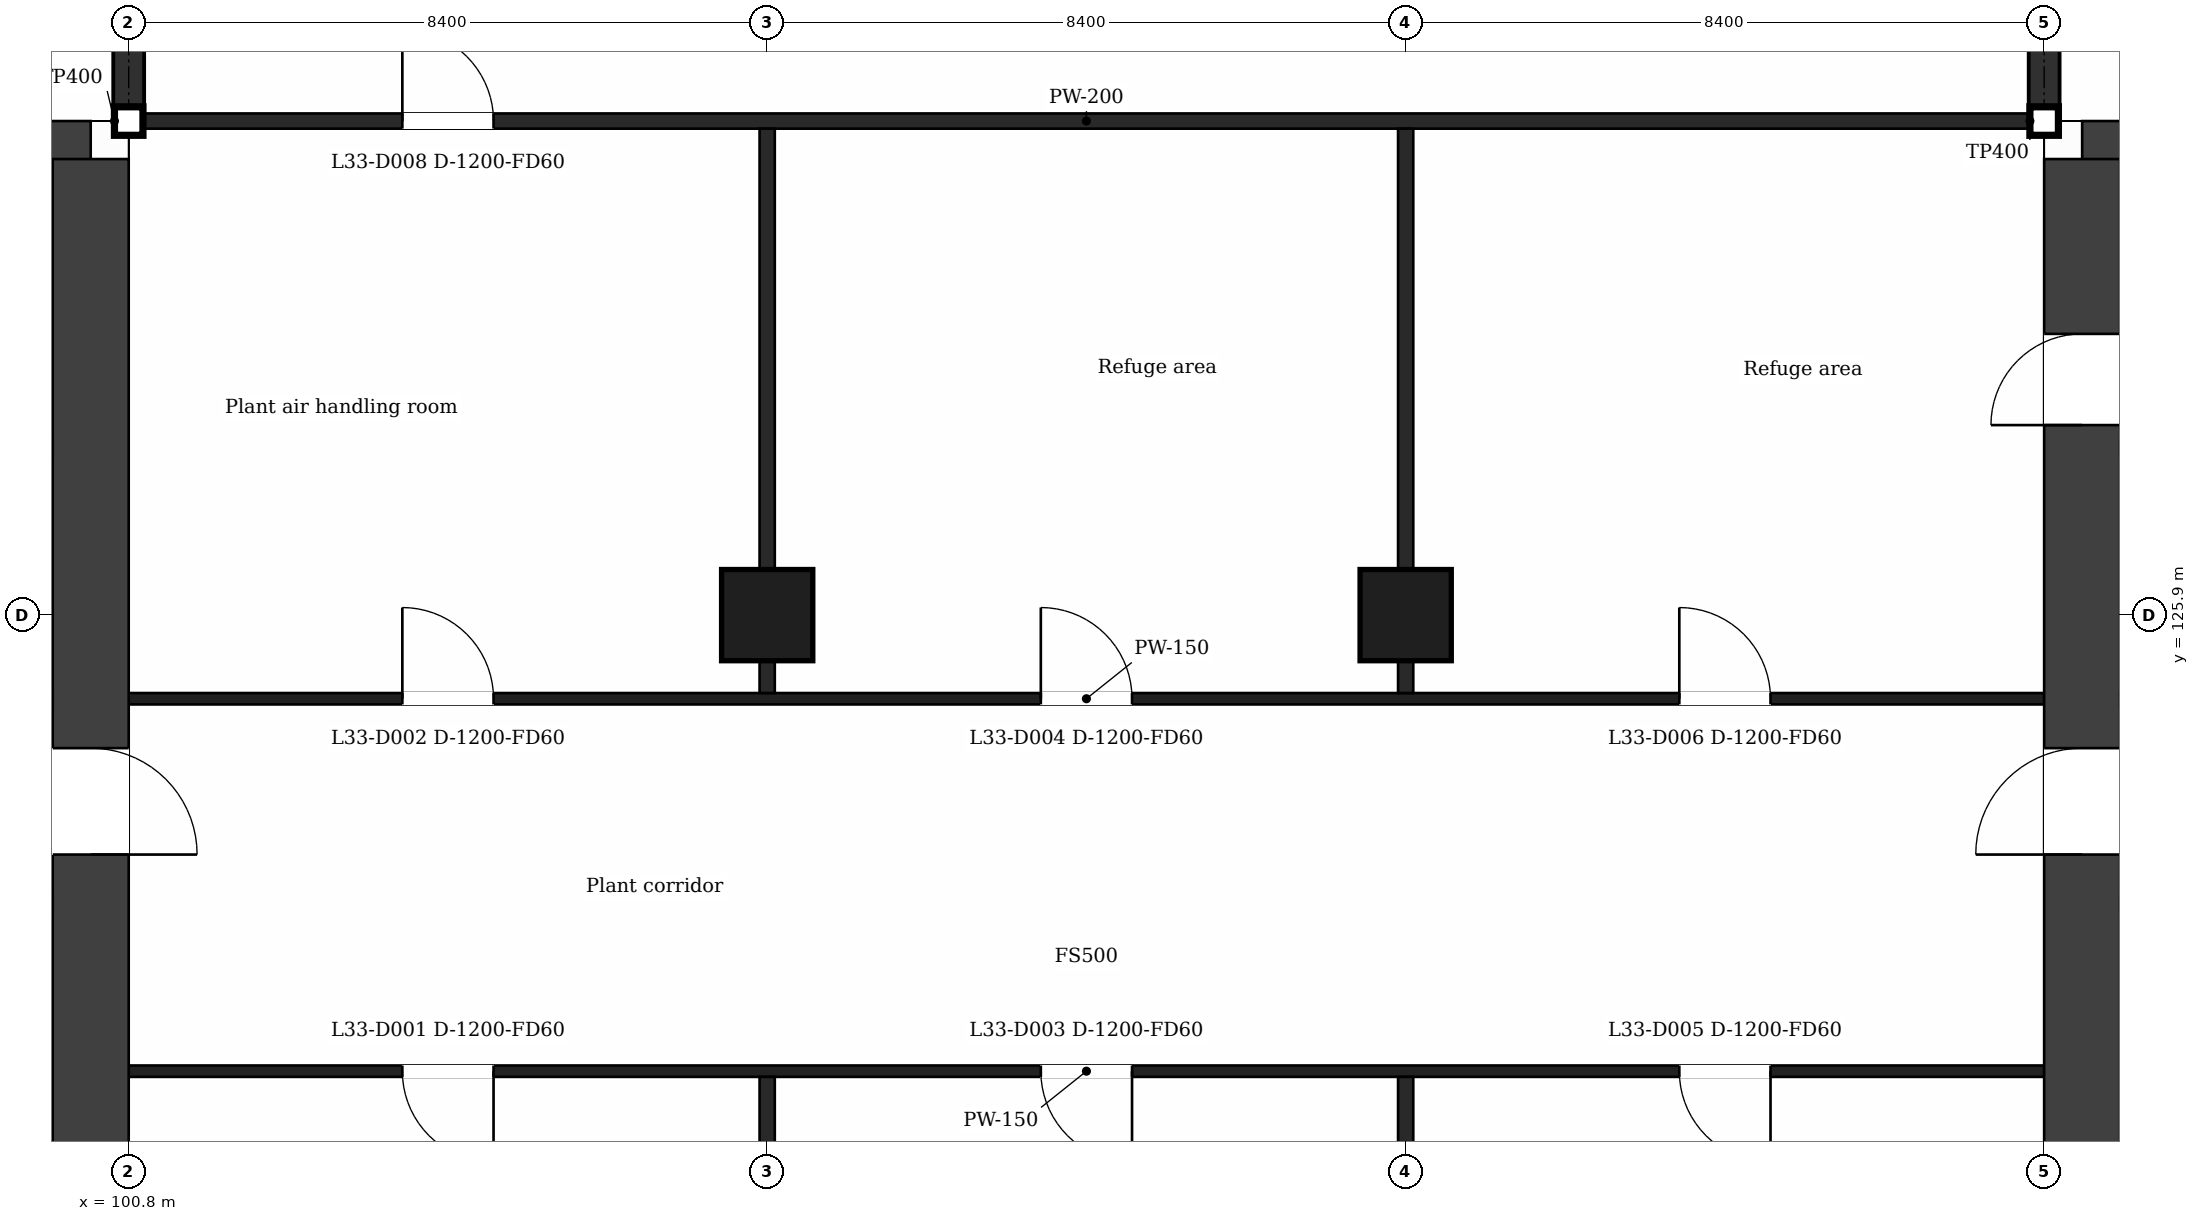
"""IFC4 building model, lengths in metres.
Left out: names, types, materials, properties, quantities, classifications, styles, units other than length and angle.
Written with IfcOpenShell. Run it as: python <this file> out.ifc"""

import sys

from ifc_helpers import new_model, si_unit, direction, frame, frame_2d, origin, origin_2d, place, context, subcontext, project, spatial, rectangle, extrude, element, fill, save


model = new_model("IFC4")
c1 = context("Model", 3, precision=1e-05, world=origin(), true_north=direction((0.0, 1.0)))
c2 = subcontext(c1, "Body", "Model", "MODEL_VIEW")
j1 = project(units=[si_unit("LENGTHUNIT", "METRE"), si_unit("PLANEANGLEUNIT", "RADIAN")], contexts=[c1])
p1 = place(None, origin())
s1 = spatial("IfcSite", under=j1, at=p1, CompositionType="ELEMENT")
p2 = place(p1, origin())
s2 = spatial("IfcBuilding", under=s1, at=p2, CompositionType="ELEMENT")
p3 = place(p2, frame((0.0, 0.0, 142.8)))
s3 = spatial("IfcBuildingStorey", under=s2, at=p3, CompositionType="ELEMENT", Elevation=142.8)
p4 = place(p3, frame((89.068, 131.9, 0.0), z_axis=(0.0, 0.0, 1.0), x_axis=(1.0, 0.0, 0.0)))
e1 = element("IfcWall", 1, at=p4, inside=s3, PredefinedType="SHEAR", context=c2, shape_type="SweptSolid", body=[
    extrude(rectangle(XDim=11.232, YDim=1.0, at=frame_2d((5.616, 0.0))), origin(), (0.0, 0.0, 1.0), 5.0),
])
p5 = place(p4, frame((6.646, 0.0, 0.0)))
e2 = element("IfcOpeningElement", 2, at=p5, cuts=e1, PredefinedType="OPENING", context=c2, shape_type="SweptSolid", body=[
    extrude(rectangle(XDim=1.2, YDim=2.1, at=frame_2d((0.6, 1.05))), frame((0.0, 0.51, 0.0), z_axis=(0.0, -1.0, 0.0), x_axis=(1.0, 0.0, 0.0)), (0.0, 0.0, 1.0), 1.02),
])
p6 = place(p3, frame((100.3, 131.9, 0.0), z_axis=(0.0, 0.0, 1.0), x_axis=(0.0, -1.0, 0.0)))
e3 = element("IfcWall", 3, at=p6, inside=s3, PredefinedType="SHEAR", context=c2, shape_type="SweptSolid", body=[
    extrude(rectangle(XDim=21.0, YDim=1.0, at=frame_2d((10.5, 0.0))), origin(), (0.0, 0.0, 1.0), 5.0),
])
p7 = place(p6, frame((18.7, 0.0, 0.0)))
e4 = element("IfcOpeningElement", 4, at=p7, cuts=e3, PredefinedType="OPENING", context=c2, shape_type="SweptSolid", body=[
    extrude(rectangle(XDim=1.2, YDim=2.1, at=frame_2d((0.6, 1.05))), frame((0.0, 0.51, 0.0), z_axis=(0.0, -1.0, 0.0), x_axis=(1.0, 0.0, 0.0)), (0.0, 0.0, 1.0), 1.02),
])
p8 = place(p6, frame((7.75, 0.0, 0.0)))
e5 = element("IfcOpeningElement", 5, at=p8, cuts=e3, PredefinedType="OPENING", context=c2, shape_type="SweptSolid", body=[
    extrude(rectangle(XDim=1.4, YDim=2.1, at=frame_2d((0.7, 1.05))), frame((0.0, 0.51, 0.0), z_axis=(0.0, -1.0, 0.0), x_axis=(1.0, 0.0, 0.0)), (0.0, 0.0, 1.0), 1.02),
])
p9 = place(p3, frame((126.5, 131.9, 0.0), z_axis=(0.0, 0.0, 1.0), x_axis=(1.0, 0.0, 0.0)))
e6 = element("IfcWall", 6, at=p9, inside=s3, PredefinedType="SHEAR", context=c2, shape_type="SweptSolid", body=[
    extrude(rectangle(XDim=11.232, YDim=1.0, at=frame_2d((5.616, 0.0))), origin(), (0.0, 0.0, 1.0), 5.0),
])
p10 = place(p9, frame((3.386, 0.0, 0.0)))
e7 = element("IfcOpeningElement", 7, at=p10, cuts=e6, PredefinedType="OPENING", context=c2, shape_type="SweptSolid", body=[
    extrude(rectangle(XDim=1.2, YDim=2.1, at=frame_2d((0.6, 1.05))), frame((0.0, 0.51, 0.0), z_axis=(0.0, -1.0, 0.0), x_axis=(1.0, 0.0, 0.0)), (0.0, 0.0, 1.0), 1.02),
])
p11 = place(p3, frame((126.5, 110.9, 0.0), z_axis=(0.0, 0.0, 1.0), x_axis=(0.0, 1.0, 0.0)))
e8 = element("IfcWall", 8, at=p11, inside=s3, PredefinedType="SHEAR", context=c2, shape_type="SweptSolid", body=[
    extrude(rectangle(XDim=21.0, YDim=1.0, at=frame_2d((10.5, 0.0))), origin(), (0.0, 0.0, 1.0), 5.0),
])
p12 = place(p11, frame((17.5, 0.0, 0.0)))
e9 = element("IfcOpeningElement", 9, at=p12, cuts=e8, PredefinedType="OPENING", context=c2, shape_type="SweptSolid", body=[
    extrude(rectangle(XDim=1.2, YDim=2.1, at=frame_2d((0.6, 1.05))), frame((0.0, 0.51, 0.0), z_axis=(0.0, -1.0, 0.0), x_axis=(1.0, 0.0, 0.0)), (0.0, 0.0, 1.0), 1.02),
])
p13 = place(p11, frame((11.85, 0.0, 0.0)))
e10 = element("IfcOpeningElement", 10, at=p13, cuts=e8, PredefinedType="OPENING", context=c2, shape_type="SweptSolid", body=[
    extrude(rectangle(XDim=1.4, YDim=2.1, at=frame_2d((0.7, 1.05))), frame((0.0, 0.51, 0.0), z_axis=(0.0, -1.0, 0.0), x_axis=(1.0, 0.0, 0.0)), (0.0, 0.0, 1.0), 1.02),
])
for number, where, z_axis, x_axis in (
    (11, (109.2, 125.9, 0.0), (0.0, 0.0, 1.0), (1.0, 0.0, 0.0)),
    (12, (117.6, 125.9, 0.0), (0.0, 0.0, 1.0), (1.0, 0.0, 0.0)),
):
    element("IfcColumn", number, at=place(p3, frame(where, z_axis=z_axis, x_axis=x_axis)), inside=s3, PredefinedType="COLUMN", context=c2, shape_type="SweptSolid", body=[
        extrude(rectangle(XDim=1.2, YDim=1.2, at=origin_2d()), origin(), (0.0, 0.0, 1.0), 5.0),
    ])
p14 = place(p3, frame((100.8, 119.9, 0.0), z_axis=(0.0, 0.0, 1.0), x_axis=(1.0, 0.0, 0.0)))
e13 = element("IfcWall", 13, at=p14, inside=s3, PredefinedType="PARTITIONING", context=c2, shape_type="SweptSolid", body=[
    extrude(rectangle(XDim=25.2, YDim=0.15, at=frame_2d((12.6, 0.0))), origin(), (0.0, 0.0, 1.0), 4.68),
])
p15 = place(p14, frame((3.6, 0.0, 0.0)))
e14 = element("IfcOpeningElement", 14, at=p15, cuts=e13, PredefinedType="OPENING", context=c2, shape_type="SweptSolid", body=[
    extrude(rectangle(XDim=1.2, YDim=2.1, at=frame_2d((0.6, 1.05))), frame((0.0, 0.085, 0.0), z_axis=(0.0, -1.0, 0.0), x_axis=(1.0, 0.0, 0.0)), (0.0, 0.0, 1.0), 0.17),
])
p16 = place(p14, frame((12.0, 0.0, 0.0)))
e15 = element("IfcOpeningElement", 15, at=p16, cuts=e13, PredefinedType="OPENING", context=c2, shape_type="SweptSolid", body=[
    extrude(rectangle(XDim=1.2, YDim=2.1, at=frame_2d((0.6, 1.05))), frame((0.0, 0.085, 0.0), z_axis=(0.0, -1.0, 0.0), x_axis=(1.0, 0.0, 0.0)), (0.0, 0.0, 1.0), 0.17),
])
p17 = place(p14, frame((20.4, 0.0, 0.0)))
e16 = element("IfcOpeningElement", 16, at=p17, cuts=e13, PredefinedType="OPENING", context=c2, shape_type="SweptSolid", body=[
    extrude(rectangle(XDim=1.2, YDim=2.1, at=frame_2d((0.6, 1.05))), frame((0.0, 0.085, 0.0), z_axis=(0.0, -1.0, 0.0), x_axis=(1.0, 0.0, 0.0)), (0.0, 0.0, 1.0), 0.17),
])
p18 = place(p3, frame((95.227, 122.1, 0.0), z_axis=(0.0, 0.0, 1.0), x_axis=(1.0, 0.0, 0.0)))
e17 = element("IfcWall", 17, at=p18, inside=s3, PredefinedType="PARTITIONING", context=c2, shape_type="SweptSolid", body=[
    extrude(rectangle(XDim=4.573, YDim=0.2, at=frame_2d((2.287, 0.0))), origin(), (0.0, 0.0, 1.0), 4.68),
])
p19 = place(p18, frame((0.522, 0.0, 0.0)))
e18 = element("IfcOpeningElement", 18, at=p19, cuts=e17, PredefinedType="OPENING", context=c2, shape_type="SweptSolid", body=[
    extrude(rectangle(XDim=0.9, YDim=2.1, at=frame_2d((0.45, 1.05))), frame((0.0, 0.11, 0.0), z_axis=(0.0, -1.0, 0.0), x_axis=(1.0, 0.0, 0.0)), (0.0, 0.0, 1.0), 0.22),
])
p20 = place(p18, frame((2.98, 0.0, 0.0)))
e19 = element("IfcOpeningElement", 19, at=p20, cuts=e17, PredefinedType="OPENING", context=c2, shape_type="SweptSolid", body=[
    extrude(rectangle(XDim=0.9, YDim=2.1, at=frame_2d((0.45, 1.05))), frame((0.0, 0.11, 0.0), z_axis=(0.0, -1.0, 0.0), x_axis=(1.0, 0.0, 0.0)), (0.0, 0.0, 1.0), 0.22),
])
p21 = place(p3, frame((127.0, 124.8, 0.0), z_axis=(0.0, 0.0, 1.0), x_axis=(1.0, 0.0, 0.0)))
e20 = element("IfcWall", 20, at=p21, inside=s3, PredefinedType="PARTITIONING", context=c2, shape_type="SweptSolid", body=[
    extrude(rectangle(XDim=4.649, YDim=0.2, at=frame_2d((2.324, 0.0))), origin(), (0.0, 0.0, 1.0), 4.68),
])
p22 = place(p21, frame((0.481, 0.0, 0.0)))
e21 = element("IfcOpeningElement", 21, at=p22, cuts=e20, PredefinedType="OPENING", context=c2, shape_type="SweptSolid", body=[
    extrude(rectangle(XDim=1.1, YDim=2.1, at=frame_2d((0.55, 1.05))), frame((0.0, 0.11, 0.0), z_axis=(0.0, -1.0, 0.0), x_axis=(1.0, 0.0, 0.0)), (0.0, 0.0, 1.0), 0.22),
])
p23 = place(p3, frame((100.8, 124.8, 0.0), z_axis=(0.0, 0.0, 1.0), x_axis=(1.0, 0.0, 0.0)))
e22 = element("IfcWall", 22, at=p23, inside=s3, PredefinedType="PARTITIONING", context=c2, shape_type="SweptSolid", body=[
    extrude(rectangle(XDim=25.2, YDim=0.15, at=frame_2d((12.6, 0.0))), origin(), (0.0, 0.0, 1.0), 4.68),
])
p24 = place(p23, frame((3.6, 0.0, 0.0)))
e23 = element("IfcOpeningElement", 23, at=p24, cuts=e22, PredefinedType="OPENING", context=c2, shape_type="SweptSolid", body=[
    extrude(rectangle(XDim=1.2, YDim=2.1, at=frame_2d((0.6, 1.05))), frame((0.0, 0.085, 0.0), z_axis=(0.0, -1.0, 0.0), x_axis=(1.0, 0.0, 0.0)), (0.0, 0.0, 1.0), 0.17),
])
p25 = place(p23, frame((12.0, 0.0, 0.0)))
e24 = element("IfcOpeningElement", 24, at=p25, cuts=e22, PredefinedType="OPENING", context=c2, shape_type="SweptSolid", body=[
    extrude(rectangle(XDim=1.2, YDim=2.1, at=frame_2d((0.6, 1.05))), frame((0.0, 0.085, 0.0), z_axis=(0.0, -1.0, 0.0), x_axis=(1.0, 0.0, 0.0)), (0.0, 0.0, 1.0), 0.17),
])
p26 = place(p23, frame((20.4, 0.0, 0.0)))
e25 = element("IfcOpeningElement", 25, at=p26, cuts=e22, PredefinedType="OPENING", context=c2, shape_type="SweptSolid", body=[
    extrude(rectangle(XDim=1.2, YDim=2.1, at=frame_2d((0.6, 1.05))), frame((0.0, 0.085, 0.0), z_axis=(0.0, -1.0, 0.0), x_axis=(1.0, 0.0, 0.0)), (0.0, 0.0, 1.0), 0.17),
])
p27 = place(p3, frame((127.0, 128.1, 0.0), z_axis=(0.0, 0.0, 1.0), x_axis=(1.0, 0.0, 0.0)))
e26 = element("IfcWall", 26, at=p27, inside=s3, PredefinedType="PARTITIONING", context=c2, shape_type="SweptSolid", body=[
    extrude(rectangle(XDim=4.649, YDim=0.2, at=frame_2d((2.324, 0.0))), origin(), (0.0, 0.0, 1.0), 4.68),
])
p28 = place(p27, frame((2.805, 0.0, 0.0)))
e27 = element("IfcOpeningElement", 27, at=p28, cuts=e26, PredefinedType="OPENING", context=c2, shape_type="SweptSolid", body=[
    extrude(rectangle(XDim=1.1, YDim=2.1, at=frame_2d((0.55, 1.05))), frame((0.0, 0.11, 0.0), z_axis=(0.0, -1.0, 0.0), x_axis=(1.0, 0.0, 0.0)), (0.0, 0.0, 1.0), 0.22),
])
p29 = place(p3, frame((100.7, 132.4, 0.0), z_axis=(0.0, 0.0, 1.0), x_axis=(1.0, 0.0, 0.0)))
e28 = element("IfcWall", 28, at=p29, inside=s3, PredefinedType="PARTITIONING", context=c2, shape_type="SweptSolid", body=[
    extrude(rectangle(XDim=25.4, YDim=0.2, at=frame_2d((12.7, 0.0))), origin(), (0.0, 0.0, 1.0), 4.68),
])
p30 = place(p29, frame((3.7, 0.0, 0.0)))
e29 = element("IfcOpeningElement", 29, at=p30, cuts=e28, PredefinedType="OPENING", context=c2, shape_type="SweptSolid", body=[
    extrude(rectangle(XDim=1.2, YDim=2.1, at=frame_2d((0.6, 1.05))), frame((0.0, 0.11, 0.0), z_axis=(0.0, -1.0, 0.0), x_axis=(1.0, 0.0, 0.0)), (0.0, 0.0, 1.0), 0.22),
])
p31 = place(p3, frame((100.8, 132.5, 0.0), z_axis=(0.0, 0.0, 1.0), x_axis=(0.0, 1.0, 0.0)))
e30 = element("IfcWall", 30, at=p31, inside=s3, PredefinedType="PARTITIONING", context=c2, shape_type="SweptSolid", body=[
    extrude(rectangle(XDim=10.51, YDim=0.2, at=frame_2d((5.255, 0.0))), origin(), (0.0, 0.0, 1.0), 4.68),
])
p32 = place(p3, frame((109.2, 110.5, 0.0), z_axis=(0.0, 0.0, 1.0), x_axis=(0.0, 1.0, 0.0)))
e31 = element("IfcWall", 31, at=p32, inside=s3, PredefinedType="PARTITIONING", context=c2, shape_type="SweptSolid", body=[
    extrude(rectangle(XDim=9.325, YDim=0.2, at=frame_2d((4.663, 0.0))), origin(), (0.0, 0.0, 1.0), 4.68),
])
p33 = place(p3, frame((109.2, 124.875, 0.0), z_axis=(0.0, 0.0, 1.0), x_axis=(0.0, 1.0, 0.0)))
e32 = element("IfcWall", 32, at=p33, inside=s3, PredefinedType="PARTITIONING", context=c2, shape_type="SweptSolid", body=[
    extrude(rectangle(XDim=7.425, YDim=0.2, at=frame_2d((3.712, 0.0))), origin(), (0.0, 0.0, 1.0), 4.68),
])
p34 = place(p3, frame((117.6, 110.5, 0.0), z_axis=(0.0, 0.0, 1.0), x_axis=(0.0, 1.0, 0.0)))
e33 = element("IfcWall", 33, at=p34, inside=s3, PredefinedType="PARTITIONING", context=c2, shape_type="SweptSolid", body=[
    extrude(rectangle(XDim=9.325, YDim=0.2, at=frame_2d((4.663, 0.0))), origin(), (0.0, 0.0, 1.0), 4.68),
])
p35 = place(p3, frame((117.6, 124.875, 0.0), z_axis=(0.0, 0.0, 1.0), x_axis=(0.0, 1.0, 0.0)))
e34 = element("IfcWall", 34, at=p35, inside=s3, PredefinedType="PARTITIONING", context=c2, shape_type="SweptSolid", body=[
    extrude(rectangle(XDim=7.425, YDim=0.2, at=frame_2d((3.712, 0.0))), origin(), (0.0, 0.0, 1.0), 4.68),
])
p36 = place(p3, frame((126.0, 132.5, 0.0), z_axis=(0.0, 0.0, 1.0), x_axis=(0.0, 1.0, 0.0)))
e35 = element("IfcWall", 35, at=p36, inside=s3, PredefinedType="PARTITIONING", context=c2, shape_type="SweptSolid", body=[
    extrude(rectangle(XDim=10.51, YDim=0.2, at=frame_2d((5.255, 0.0))), origin(), (0.0, 0.0, 1.0), 4.68),
])
p37 = place(p15, origin())
e36 = element("IfcDoor", 36, at=p37, inside=s3, OperationType="SINGLE_SWING_RIGHT", PredefinedType="DOOR", context=c2, shape_type="SweptSolid", body=[
    extrude(rectangle(XDim=1.2, YDim=2.1, at=frame_2d((0.6, 1.05))), frame((0.0, 0.025, 0.0), z_axis=(0.0, -1.0, 0.0), x_axis=(1.0, 0.0, 0.0)), (0.0, 0.0, 1.0), 0.05),
])
fill(e14, e36)
p38 = place(p24, origin())
e37 = element("IfcDoor", 37, at=p38, inside=s3, OperationType="SINGLE_SWING_LEFT", PredefinedType="DOOR", context=c2, shape_type="SweptSolid", body=[
    extrude(rectangle(XDim=1.2, YDim=2.1, at=frame_2d((0.6, 1.05))), frame((0.0, 0.025, 0.0), z_axis=(0.0, -1.0, 0.0), x_axis=(1.0, 0.0, 0.0)), (0.0, 0.0, 1.0), 0.05),
])
fill(e23, e37)
p39 = place(p16, origin())
e38 = element("IfcDoor", 38, at=p39, inside=s3, OperationType="SINGLE_SWING_RIGHT", PredefinedType="DOOR", context=c2, shape_type="SweptSolid", body=[
    extrude(rectangle(XDim=1.2, YDim=2.1, at=frame_2d((0.6, 1.05))), frame((0.0, 0.025, 0.0), z_axis=(0.0, -1.0, 0.0), x_axis=(1.0, 0.0, 0.0)), (0.0, 0.0, 1.0), 0.05),
])
fill(e15, e38)
p40 = place(p25, origin())
e39 = element("IfcDoor", 39, at=p40, inside=s3, OperationType="SINGLE_SWING_LEFT", PredefinedType="DOOR", context=c2, shape_type="SweptSolid", body=[
    extrude(rectangle(XDim=1.2, YDim=2.1, at=frame_2d((0.6, 1.05))), frame((0.0, 0.025, 0.0), z_axis=(0.0, -1.0, 0.0), x_axis=(1.0, 0.0, 0.0)), (0.0, 0.0, 1.0), 0.05),
])
fill(e24, e39)
p41 = place(p17, origin())
e40 = element("IfcDoor", 40, at=p41, inside=s3, OperationType="SINGLE_SWING_RIGHT", PredefinedType="DOOR", context=c2, shape_type="SweptSolid", body=[
    extrude(rectangle(XDim=1.2, YDim=2.1, at=frame_2d((0.6, 1.05))), frame((0.0, 0.025, 0.0), z_axis=(0.0, -1.0, 0.0), x_axis=(1.0, 0.0, 0.0)), (0.0, 0.0, 1.0), 0.05),
])
fill(e16, e40)
p42 = place(p26, origin())
e41 = element("IfcDoor", 41, at=p42, inside=s3, OperationType="SINGLE_SWING_LEFT", PredefinedType="DOOR", context=c2, shape_type="SweptSolid", body=[
    extrude(rectangle(XDim=1.2, YDim=2.1, at=frame_2d((0.6, 1.05))), frame((0.0, 0.025, 0.0), z_axis=(0.0, -1.0, 0.0), x_axis=(1.0, 0.0, 0.0)), (0.0, 0.0, 1.0), 0.05),
])
fill(e25, e41)
p43 = place(p30, origin())
e42 = element("IfcDoor", 42, at=p43, inside=s3, OperationType="SINGLE_SWING_LEFT", PredefinedType="DOOR", context=c2, shape_type="SweptSolid", body=[
    extrude(rectangle(XDim=1.2, YDim=2.1, at=frame_2d((0.6, 1.05))), frame((0.0, 0.025, 0.0), z_axis=(0.0, -1.0, 0.0), x_axis=(1.0, 0.0, 0.0)), (0.0, 0.0, 1.0), 0.05),
])
fill(e29, e42)
p44 = place(p12, origin())
e43 = element("IfcDoor", 43, at=p44, inside=s3, OperationType="SINGLE_SWING_LEFT", PredefinedType="DOOR", context=c2, shape_type="SweptSolid", body=[
    extrude(rectangle(XDim=1.2, YDim=2.1, at=frame_2d((0.6, 1.05))), frame((0.0, 0.025, 0.0), z_axis=(0.0, -1.0, 0.0), x_axis=(1.0, 0.0, 0.0)), (0.0, 0.0, 1.0), 0.05),
])
fill(e9, e43)
p45 = place(p8, origin())
e44 = element("IfcDoor", 44, at=p45, inside=s3, OperationType="SINGLE_SWING_RIGHT", PredefinedType="DOOR", context=c2, shape_type="SweptSolid", body=[
    extrude(rectangle(XDim=1.4, YDim=2.1, at=frame_2d((0.7, 1.05))), frame((0.0, 0.025, 0.0), z_axis=(0.0, -1.0, 0.0), x_axis=(1.0, 0.0, 0.0)), (0.0, 0.0, 1.0), 0.05),
])
fill(e5, e44)
p46 = place(p13, origin())
e45 = element("IfcDoor", 45, at=p46, inside=s3, OperationType="SINGLE_SWING_LEFT", PredefinedType="DOOR", context=c2, shape_type="SweptSolid", body=[
    extrude(rectangle(XDim=1.4, YDim=2.1, at=frame_2d((0.7, 1.05))), frame((0.0, 0.025, 0.0), z_axis=(0.0, -1.0, 0.0), x_axis=(1.0, 0.0, 0.0)), (0.0, 0.0, 1.0), 0.05),
])
fill(e10, e45)
save(model, sys.argv[1])
